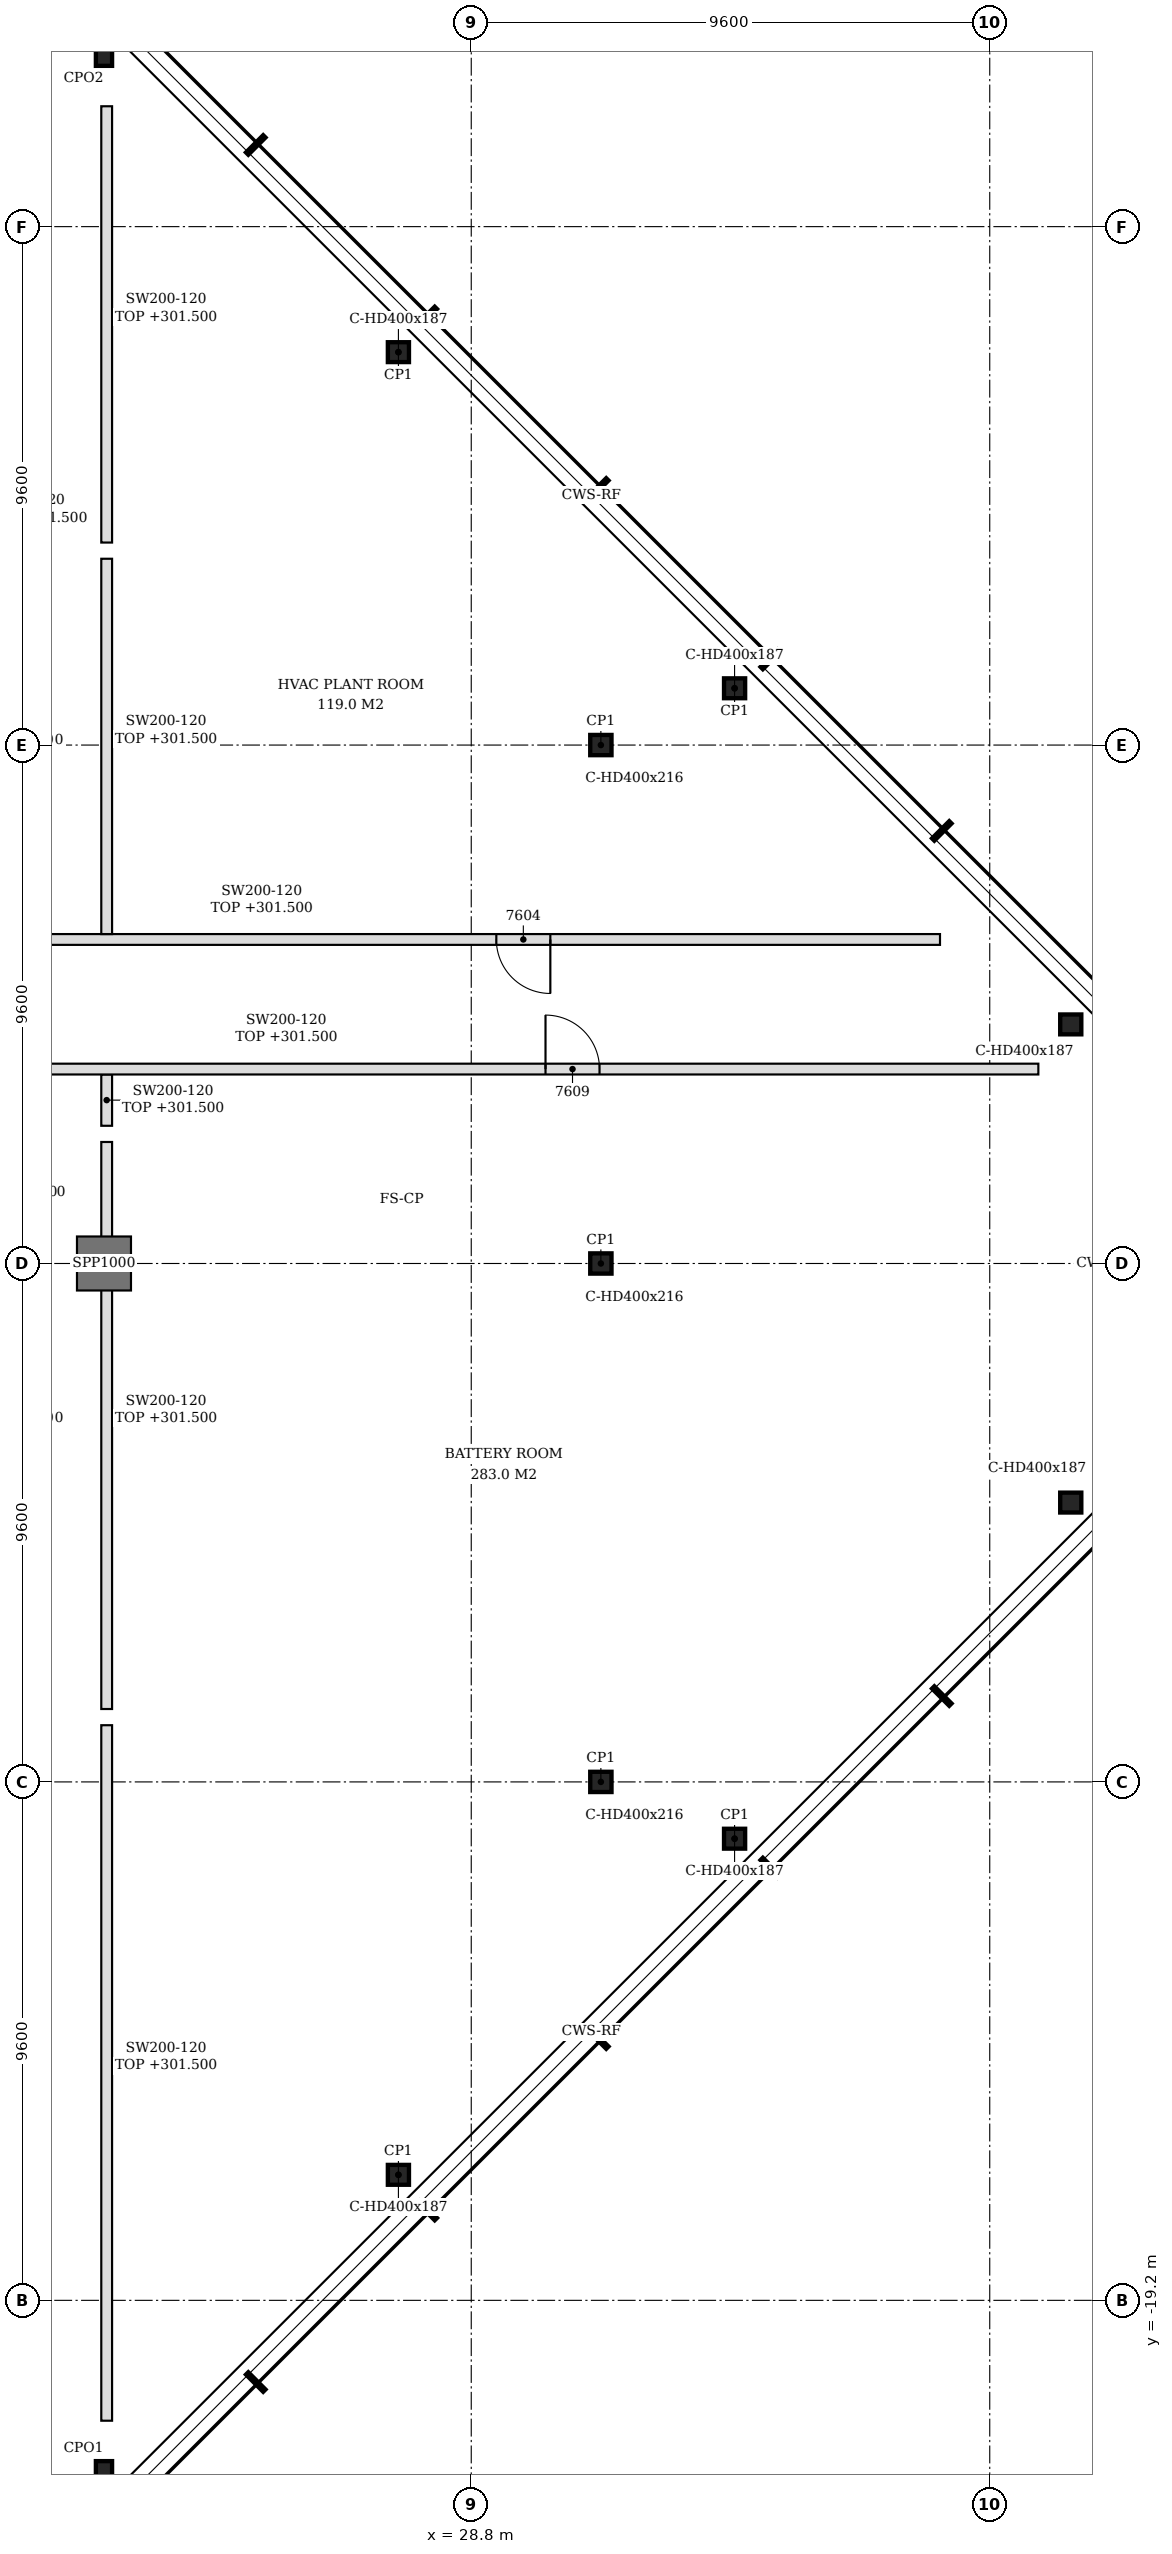
"""IFC4 building model, lengths in metres.
Left out: names, types, materials, properties, quantities, classifications, styles, units other than length and angle.
Written with IfcOpenShell. Run it as: python <this file> out.ifc"""

import sys

from ifc_helpers import new_model, si_unit, direction, frame, frame_2d, origin, origin_2d, place, context, subcontext, project, spatial, rectangle, hollow_rectangle, i_section, extrude, clip, halfspace, element, fill, save


model = new_model("IFC4")
c1 = context("Model", 3, precision=1e-05, world=origin(), true_north=direction((0.0, 1.0)))
c2 = subcontext(c1, "Body", "Model", "MODEL_VIEW")
j1 = project(units=[si_unit("LENGTHUNIT", "METRE"), si_unit("PLANEANGLEUNIT", "RADIAN")], contexts=[c1])
p1 = place(None, origin())
s1 = spatial("IfcSite", under=j1, at=p1, CompositionType="ELEMENT")
p2 = place(p1, origin())
s2 = spatial("IfcBuilding", under=s1, at=p2, CompositionType="ELEMENT")
p3 = place(p2, frame((0.0, 0.0, 295.8)))
s3 = spatial("IfcBuildingStorey", under=s2, at=p3, CompositionType="ELEMENT", Elevation=295.8)
p4 = place(p3, frame((22.0, -22.327, 5.7), z_axis=(0.0, 0.0, 1.0), x_axis=(1.0, 0.0, 0.0)))
e1 = element("IfcColumn", 1, at=p4, inside=s3, PredefinedType="COLUMN", context=c2, shape_type="SweptSolid", body=[
    extrude(hollow_rectangle(XDim=0.3, YDim=0.3, WallThickness=0.016, InnerFilletRadius=0.016, OuterFilletRadius=0.024, at=origin_2d()), origin(), (0.0, 0.0, 1.0), 12.323),
])
p5 = place(p3, frame((27.451, -16.876, 5.7), z_axis=(0.0, 0.0, 1.0), x_axis=(1.0, 0.0, 0.0)))
e2 = element("IfcColumn", 2, at=p5, inside=s3, PredefinedType="COLUMN", context=c2, shape_type="SweptSolid", body=[
    extrude(hollow_rectangle(XDim=0.3, YDim=0.3, WallThickness=0.016, InnerFilletRadius=0.016, OuterFilletRadius=0.024, at=origin_2d()), origin(), (0.0, 0.0, 1.0), 8.408),
])
for number, where, z_axis, x_axis in (
    (3, (33.676, -10.652, 5.7), (0.0, 0.0, 1.0), (1.0, 0.0, 0.0)),
    (4, (33.676, 10.652, 5.7), (0.0, 0.0, 1.0), (1.0, 0.0, 0.0)),
):
    element("IfcColumn", number, at=place(p3, frame(where, z_axis=z_axis, x_axis=x_axis)), inside=s3, PredefinedType="COLUMN", context=c2, shape_type="SweptSolid", body=[
        extrude(hollow_rectangle(XDim=0.3, YDim=0.3, WallThickness=0.016, InnerFilletRadius=0.016, OuterFilletRadius=0.024, at=origin_2d()), origin(), (0.0, 0.0, 1.0), 3.938),
    ])
p6 = place(p3, frame((27.451, 16.876, 5.7), z_axis=(0.0, 0.0, 1.0), x_axis=(1.0, 0.0, 0.0)))
e5 = element("IfcColumn", 5, at=p6, inside=s3, PredefinedType="COLUMN", context=c2, shape_type="SweptSolid", body=[
    extrude(hollow_rectangle(XDim=0.3, YDim=0.3, WallThickness=0.016, InnerFilletRadius=0.016, OuterFilletRadius=0.024, at=origin_2d()), origin(), (0.0, 0.0, 1.0), 8.408),
])
p7 = place(p3, frame((22.0, 22.327, 5.7), z_axis=(0.0, 0.0, 1.0), x_axis=(1.0, 0.0, 0.0)))
e6 = element("IfcColumn", 6, at=p7, inside=s3, PredefinedType="COLUMN", context=c2, shape_type="SweptSolid", body=[
    extrude(hollow_rectangle(XDim=0.3, YDim=0.3, WallThickness=0.016, InnerFilletRadius=0.016, OuterFilletRadius=0.024, at=origin_2d()), origin(), (0.0, 0.0, 1.0), 12.323),
])
for number, where, z_axis, x_axis in (
    (7, (31.2, -9.6, 5.7), (0.0, 0.0, 1.0), (1.0, 0.0, 0.0)),
    (8, (31.2, 0.0, 5.7), (0.0, 0.0, 1.0), (1.0, 0.0, 0.0)),
    (9, (31.2, 9.6, 5.7), (0.0, 0.0, 1.0), (1.0, 0.0, 0.0)),
):
    element("IfcColumn", number, at=place(p3, frame(where, z_axis=z_axis, x_axis=x_axis)), inside=s3, PredefinedType="COLUMN", context=c2, shape_type="SweptSolid", body=[
        extrude(hollow_rectangle(XDim=0.3, YDim=0.3, WallThickness=0.016, InnerFilletRadius=0.016, OuterFilletRadius=0.024, at=origin_2d()), origin(), (0.0, 0.0, 1.0), 5.716),
    ])
for number, where, z_axis, x_axis in (
    (10, (19.2, -8.4, 5.7), (0.215, 0.0, 0.977), (0.0, 1.0, 0.0)),
    (11, (19.2, 2.4, 5.7), (0.215, 0.0, 0.977), (0.0, 1.0, 0.0)),
    (12, (19.2, 13.2, 5.7), (0.215, 0.0, 0.977), (0.0, 1.0, 0.0)),
):
    element("IfcColumn", number, at=place(p3, frame(where, z_axis=z_axis, x_axis=x_axis)), inside=s3, PredefinedType="COLUMN", context=c2, shape_type="Clipping", body=[
        clip(extrude(hollow_rectangle(XDim=0.3, YDim=0.3, WallThickness=0.016, InnerFilletRadius=0.016, OuterFilletRadius=0.024, at=origin_2d()), origin(), (0.0, 0.0, 1.0), 13.025), halfspace(frame((0.0, 0.0, 0.032), z_axis=(0.0, 0.0, 1.0), x_axis=(1.0, 0.0, 0.0)), True)),
    ])
for number, where, z_axis, x_axis in (
    (13, (27.451, -16.876, -0.2), (0.0, 0.0, 1.0), (1.0, 0.0, 0.0)),
    (14, (33.676, -10.652, -0.2), (0.0, 0.0, 1.0), (1.0, 0.0, 0.0)),
    (15, (39.9, -4.427, -0.2), (0.0, 0.0, 1.0), (1.0, 0.0, 0.0)),
    (16, (39.9, 4.427, -0.2), (0.0, 0.0, 1.0), (1.0, 0.0, 0.0)),
    (17, (33.676, 10.652, -0.2), (0.0, 0.0, 1.0), (1.0, 0.0, 0.0)),
    (18, (27.451, 16.876, -0.2), (0.0, 0.0, 1.0), (1.0, 0.0, 0.0)),
):
    element("IfcColumn", number, at=place(p3, frame(where, z_axis=z_axis, x_axis=x_axis)), inside=s3, PredefinedType="COLUMN", context=c2, shape_type="SweptSolid", body=[
        extrude(i_section(OverallWidth=0.391, OverallDepth=0.368, WebThickness=0.015, FlangeThickness=0.024, FilletRadius=0.015, at=origin_2d()), origin(), (0.0, 0.0, 1.0), 5.9),
    ])
for number, where, z_axis, x_axis in (
    (19, (31.2, -9.6, -0.2), (0.0, 0.0, 1.0), (1.0, 0.0, 0.0)),
    (20, (31.2, 0.0, -0.2), (0.0, 0.0, 1.0), (1.0, 0.0, 0.0)),
    (21, (31.2, 9.6, -0.2), (0.0, 0.0, 1.0), (1.0, 0.0, 0.0)),
):
    element("IfcColumn", number, at=place(p3, frame(where, z_axis=z_axis, x_axis=x_axis)), inside=s3, PredefinedType="COLUMN", context=c2, shape_type="SweptSolid", body=[
        extrude(i_section(OverallWidth=0.394, OverallDepth=0.375, WebThickness=0.017, FlangeThickness=0.028, FilletRadius=0.015, at=origin_2d()), origin(), (0.0, 0.0, 1.0), 5.9),
    ])
p8 = place(p3, frame((22.05, -21.429, 0.0), z_axis=(0.0, 0.0, 1.0), x_axis=(0.0, 1.0, 0.0)))
e22 = element("IfcWall", 22, at=p8, inside=s3, PredefinedType="PARTITIONING", context=c2, shape_type="SweptSolid", body=[
    extrude(rectangle(XDim=12.879, YDim=0.2, at=frame_2d((6.439, 0.0))), origin(), (0.0, 0.0, 1.0), 5.7),
])
p9 = place(p3, frame((22.05, -8.25, 0.0), z_axis=(0.0, 0.0, 1.0), x_axis=(0.0, 1.0, 0.0)))
e23 = element("IfcWall", 23, at=p9, inside=s3, PredefinedType="PARTITIONING", context=c2, shape_type="SweptSolid", body=[
    extrude(rectangle(XDim=10.5, YDim=0.2, at=frame_2d((5.25, 0.0))), origin(), (0.0, 0.0, 1.0), 5.7),
])
p10 = place(p3, frame((22.05, 2.55, 0.0), z_axis=(0.0, 0.0, 1.0), x_axis=(0.0, 1.0, 0.0)))
e24 = element("IfcWall", 24, at=p10, inside=s3, PredefinedType="PARTITIONING", context=c2, shape_type="SweptSolid", body=[
    extrude(rectangle(XDim=0.95, YDim=0.2, at=frame_2d((0.475, 0.0))), origin(), (0.0, 0.0, 1.0), 5.7),
])
p11 = place(p3, frame((19.1, 3.6, 0.0), z_axis=(0.0, 0.0, 1.0), x_axis=(1.0, 0.0, 0.0)))
e25 = element("IfcWall", 25, at=p11, inside=s3, PredefinedType="PARTITIONING", context=c2, shape_type="SweptSolid", body=[
    extrude(rectangle(XDim=20.2, YDim=0.2, at=frame_2d((10.1, 0.0))), origin(), (0.0, 0.0, 1.0), 5.7),
])
p12 = place(p11, frame((11.075, 0.0, 0.0)))
e26 = element("IfcOpeningElement", 26, at=p12, cuts=e25, PredefinedType="OPENING", context=c2, shape_type="SweptSolid", body=[
    extrude(rectangle(XDim=1.0, YDim=2.1, at=frame_2d((0.5, 1.05))), frame((0.0, 0.11, 0.0), z_axis=(0.0, -1.0, 0.0), x_axis=(1.0, 0.0, 0.0)), (0.0, 0.0, 1.0), 0.22),
])
p13 = place(p3, frame((19.1, 6.0, 0.0), z_axis=(0.0, 0.0, 1.0), x_axis=(1.0, 0.0, 0.0)))
e27 = element("IfcWall", 27, at=p13, inside=s3, PredefinedType="PARTITIONING", context=c2, shape_type="SweptSolid", body=[
    extrude(rectangle(XDim=18.379, YDim=0.2, at=frame_2d((9.189, 0.0))), origin(), (0.0, 0.0, 1.0), 5.7),
])
p14 = place(p13, frame((10.164, 0.0, 0.0)))
e28 = element("IfcOpeningElement", 28, at=p14, cuts=e27, PredefinedType="OPENING", context=c2, shape_type="SweptSolid", body=[
    extrude(rectangle(XDim=1.0, YDim=2.1, at=frame_2d((0.5, 1.05))), frame((0.0, 0.11, 0.0), z_axis=(0.0, -1.0, 0.0), x_axis=(1.0, 0.0, 0.0)), (0.0, 0.0, 1.0), 0.22),
])
p15 = place(p3, frame((22.05, 6.1, 0.0), z_axis=(0.0, 0.0, 1.0), x_axis=(0.0, 1.0, 0.0)))
e29 = element("IfcWall", 29, at=p15, inside=s3, PredefinedType="PARTITIONING", context=c2, shape_type="SweptSolid", body=[
    extrude(rectangle(XDim=6.95, YDim=0.2, at=frame_2d((3.475, 0.0))), origin(), (0.0, 0.0, 1.0), 5.7),
])
p16 = place(p3, frame((22.05, 13.35, 0.0), z_axis=(0.0, 0.0, 1.0), x_axis=(0.0, 1.0, 0.0)))
e30 = element("IfcWall", 30, at=p16, inside=s3, PredefinedType="PARTITIONING", context=c2, shape_type="SweptSolid", body=[
    extrude(rectangle(XDim=8.079, YDim=0.2, at=frame_2d((4.04, 0.0))), origin(), (0.0, 0.0, 1.0), 5.7),
])
p17 = place(p14, frame((1.0, 0.0, 0.0), z_axis=(0.0, 0.0, 1.0), x_axis=(-1.0, 0.0, 0.0)))
e31 = element("IfcDoor", 31, at=p17, inside=s3, OperationType="SINGLE_SWING_LEFT", PredefinedType="DOOR", context=c2, shape_type="SweptSolid", body=[
    extrude(rectangle(XDim=1.0, YDim=2.1, at=frame_2d((0.5, 1.05))), frame((0.0, 0.025, 0.0), z_axis=(0.0, -1.0, 0.0), x_axis=(1.0, 0.0, 0.0)), (0.0, 0.0, 1.0), 0.05),
])
fill(e28, e31)
p18 = place(p12, origin())
e32 = element("IfcDoor", 32, at=p18, inside=s3, OperationType="SINGLE_SWING_LEFT", PredefinedType="DOOR", context=c2, shape_type="SweptSolid", body=[
    extrude(rectangle(XDim=1.0, YDim=2.1, at=frame_2d((0.5, 1.05))), frame((0.0, 0.025, 0.0), z_axis=(0.0, -1.0, 0.0), x_axis=(1.0, 0.0, 0.0)), (0.0, 0.0, 1.0), 0.05),
])
fill(e26, e32)
save(model, sys.argv[1])
